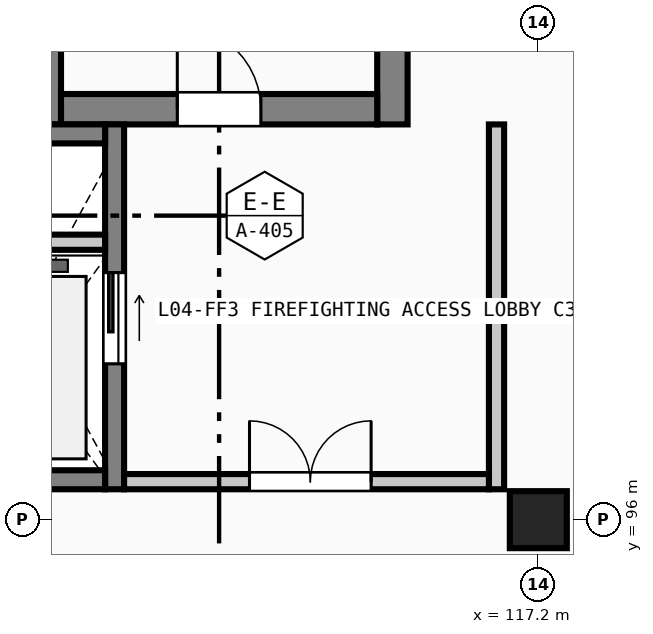
"""IFC4 building model, lengths in metres.
Left out: names, types, materials, properties, quantities, classifications, styles, units other than length and angle.
Written with IfcOpenShell. Run it as: python <this file> out.ifc"""

import sys

from ifc_helpers import new_model, si_unit, direction, frame, frame_2d, origin, origin_2d, place, context, subcontext, project, spatial, rectangle, extrude, element, fill, save


model = new_model("IFC4")
c1 = context("Model", 3, precision=1e-05, world=origin(), true_north=direction((0.0, 1.0)))
c2 = subcontext(c1, "Body", "Model", "MODEL_VIEW")
j1 = project(units=[si_unit("LENGTHUNIT", "METRE"), si_unit("PLANEANGLEUNIT", "RADIAN")], contexts=[c1])
p1 = place(None, origin())
s1 = spatial("IfcSite", under=j1, at=p1, CompositionType="ELEMENT")
p2 = place(p1, origin())
s2 = spatial("IfcBuilding", under=s1, at=p2, CompositionType="ELEMENT")
p3 = place(p2, frame((0.0, 0.0, 18.88)))
s3 = spatial("IfcBuildingStorey", under=s2, at=p3, CompositionType="ELEMENT", Elevation=18.88)
p4 = place(p3, frame((117.2, 96.0, 0.0), z_axis=(0.0, 0.0, 1.0), x_axis=(1.0, 0.0, 0.0)))
e1 = element("IfcColumn", 1, at=p4, inside=s3, PredefinedType="COLUMN", context=c2, shape_type="SweptSolid", body=[
    extrude(rectangle(XDim=0.75, YDim=0.75, at=origin_2d()), origin(), (0.0, 0.0, 1.0), 4.48),
])
for number, where, z_axis, x_axis in (
    (2, (110.72, 101.2, 0.0), (0.0, 0.0, 1.0), (0.0, 1.0, 0.0)),
    (3, (115.28, 110.4, 0.0), (0.0, 0.0, 1.0), (0.0, -1.0, 0.0)),
):
    element("IfcWall", number, at=place(p3, frame(where, z_axis=z_axis, x_axis=x_axis)), inside=s3, PredefinedType="SHEAR", context=c2, shape_type="SweptSolid", body=[
        extrude(rectangle(XDim=9.2, YDim=0.4, at=frame_2d((4.6, 0.0))), origin(), (0.0, 0.0, 1.0), 4.205),
    ])
p5 = place(p3, frame((115.08, 101.4, 0.0), z_axis=(0.0, 0.0, 1.0), x_axis=(-1.0, 0.0, 0.0)))
e4 = element("IfcWall", 4, at=p5, inside=s3, PredefinedType="SHEAR", context=c2, shape_type="SweptSolid", body=[
    extrude(rectangle(XDim=4.16, YDim=0.4, at=frame_2d((2.08, 0.0))), origin(), (0.0, 0.0, 1.0), 4.205),
])
p6 = place(p5, frame((1.53, 0.0, 0.0)))
e5 = element("IfcOpeningElement", 5, at=p6, cuts=e4, PredefinedType="OPENING", context=c2, shape_type="SweptSolid", body=[
    extrude(rectangle(XDim=1.1, YDim=2.2, at=frame_2d((0.55, 1.1))), frame((0.0, 0.21, 0.0), z_axis=(0.0, -1.0, 0.0), x_axis=(1.0, 0.0, 0.0)), (0.0, 0.0, 1.0), 0.42),
])
p7 = place(p3, frame((111.625, 101.2, 0.0), z_axis=(0.0, 0.0, 1.0), x_axis=(0.0, -1.0, 0.0)))
e6 = element("IfcWall", 6, at=p7, inside=s3, PredefinedType="SOLIDWALL", context=c2, shape_type="SweptSolid", body=[
    extrude(rectangle(XDim=4.8, YDim=0.25, at=frame_2d((2.4, 0.0))), origin(), (0.0, 0.0, 1.0), 4.205),
])
p8 = place(p7, frame((1.95, 0.0, 0.0)))
e7 = element("IfcOpeningElement", 7, at=p8, cuts=e6, PredefinedType="OPENING", context=c2, shape_type="SweptSolid", body=[
    extrude(rectangle(XDim=1.2, YDim=2.2, at=frame_2d((0.6, 1.1))), frame((0.0, 0.135, 0.0), z_axis=(0.0, -1.0, 0.0), x_axis=(1.0, 0.0, 0.0)), (0.0, 0.0, 1.0), 0.27),
])
for number, where, z_axis, x_axis in (
    (8, (111.5, 96.525, 0.0), (0.0, 0.0, 1.0), (-1.0, 0.0, 0.0)),
    (9, (109.4, 101.075, 0.0), (0.0, 0.0, 1.0), (1.0, 0.0, 0.0)),
):
    element("IfcWall", number, at=place(p3, frame(where, z_axis=z_axis, x_axis=x_axis)), inside=s3, PredefinedType="SOLIDWALL", context=c2, shape_type="SweptSolid", body=[
        extrude(rectangle(XDim=2.1, YDim=0.25, at=frame_2d((1.05, 0.0))), origin(), (0.0, 0.0, 1.0), 4.205),
    ])
p9 = place(p3, frame((109.4, 99.65, 0.0), z_axis=(0.0, 0.0, 1.0), x_axis=(1.0, 0.0, 0.0)))
e10 = element("IfcWall", 10, at=p9, inside=s3, PredefinedType="SOLIDWALL", context=c2, shape_type="SweptSolid", body=[
    extrude(rectangle(XDim=2.1, YDim=0.2, at=frame_2d((1.05, 0.0))), origin(), (0.0, 0.0, 1.0), 4.205),
])
p10 = place(p3, frame((116.65, 101.2, 0.0), z_axis=(0.0, 0.0, 1.0), x_axis=(0.0, -1.0, 0.0)))
e11 = element("IfcWall", 11, at=p10, inside=s3, PredefinedType="SOLIDWALL", context=c2, shape_type="SweptSolid", body=[
    extrude(rectangle(XDim=4.8, YDim=0.2, at=frame_2d((2.4, 0.0))), origin(), (0.0, 0.0, 1.0), 4.205),
])
p11 = place(p3, frame((116.55, 96.5, 0.0), z_axis=(0.0, 0.0, 1.0), x_axis=(-1.0, 0.0, 0.0)))
e12 = element("IfcWall", 12, at=p11, inside=s3, PredefinedType="SOLIDWALL", context=c2, shape_type="SweptSolid", body=[
    extrude(rectangle(XDim=4.8, YDim=0.2, at=frame_2d((2.4, 0.0))), origin(), (0.0, 0.0, 1.0), 4.205),
])
p12 = place(p11, frame((1.55, 0.0, 0.0)))
e13 = element("IfcOpeningElement", 13, at=p12, cuts=e12, PredefinedType="OPENING", context=c2, shape_type="SweptSolid", body=[
    extrude(rectangle(XDim=1.6, YDim=2.2, at=frame_2d((0.8, 1.1))), frame((0.0, 0.11, 0.0), z_axis=(0.0, -1.0, 0.0), x_axis=(1.0, 0.0, 0.0)), (0.0, 0.0, 1.0), 0.22),
])
p13 = place(p6, frame((1.1, 0.0, 0.0), z_axis=(0.0, 0.0, 1.0), x_axis=(-1.0, 0.0, 0.0)))
e14 = element("IfcDoor", 14, at=p13, inside=s3, OperationType="SINGLE_SWING_LEFT", PredefinedType="DOOR", context=c2, shape_type="SweptSolid", body=[
    extrude(rectangle(XDim=1.1, YDim=2.2, at=frame_2d((0.55, 1.1))), frame((0.0, 0.025, 0.0), z_axis=(0.0, -1.0, 0.0), x_axis=(1.0, 0.0, 0.0)), (0.0, 0.0, 1.0), 0.05),
])
fill(e5, e14)
p14 = place(p8, origin())
e15 = element("IfcDoor", 15, at=p14, inside=s3, OperationType="SLIDING_TO_LEFT", PredefinedType="DOOR", context=c2, shape_type="SweptSolid", body=[
    extrude(rectangle(XDim=1.2, YDim=2.2, at=frame_2d((0.6, 1.1))), frame((0.0, 0.025, 0.0), z_axis=(0.0, -1.0, 0.0), x_axis=(1.0, 0.0, 0.0)), (0.0, 0.0, 1.0), 0.05),
])
fill(e7, e15)
p15 = place(p12, frame((1.6, 0.0, 0.0), z_axis=(0.0, 0.0, 1.0), x_axis=(-1.0, 0.0, 0.0)))
e16 = element("IfcDoor", 16, at=p15, inside=s3, OperationType="DOUBLE_DOOR_SINGLE_SWING", PredefinedType="DOOR", context=c2, shape_type="SweptSolid", body=[
    extrude(rectangle(XDim=1.6, YDim=2.2, at=frame_2d((0.8, 1.1))), frame((0.0, 0.025, 0.0), z_axis=(0.0, -1.0, 0.0), x_axis=(1.0, 0.0, 0.0)), (0.0, 0.0, 1.0), 0.05),
])
fill(e13, e16)
save(model, sys.argv[1])
